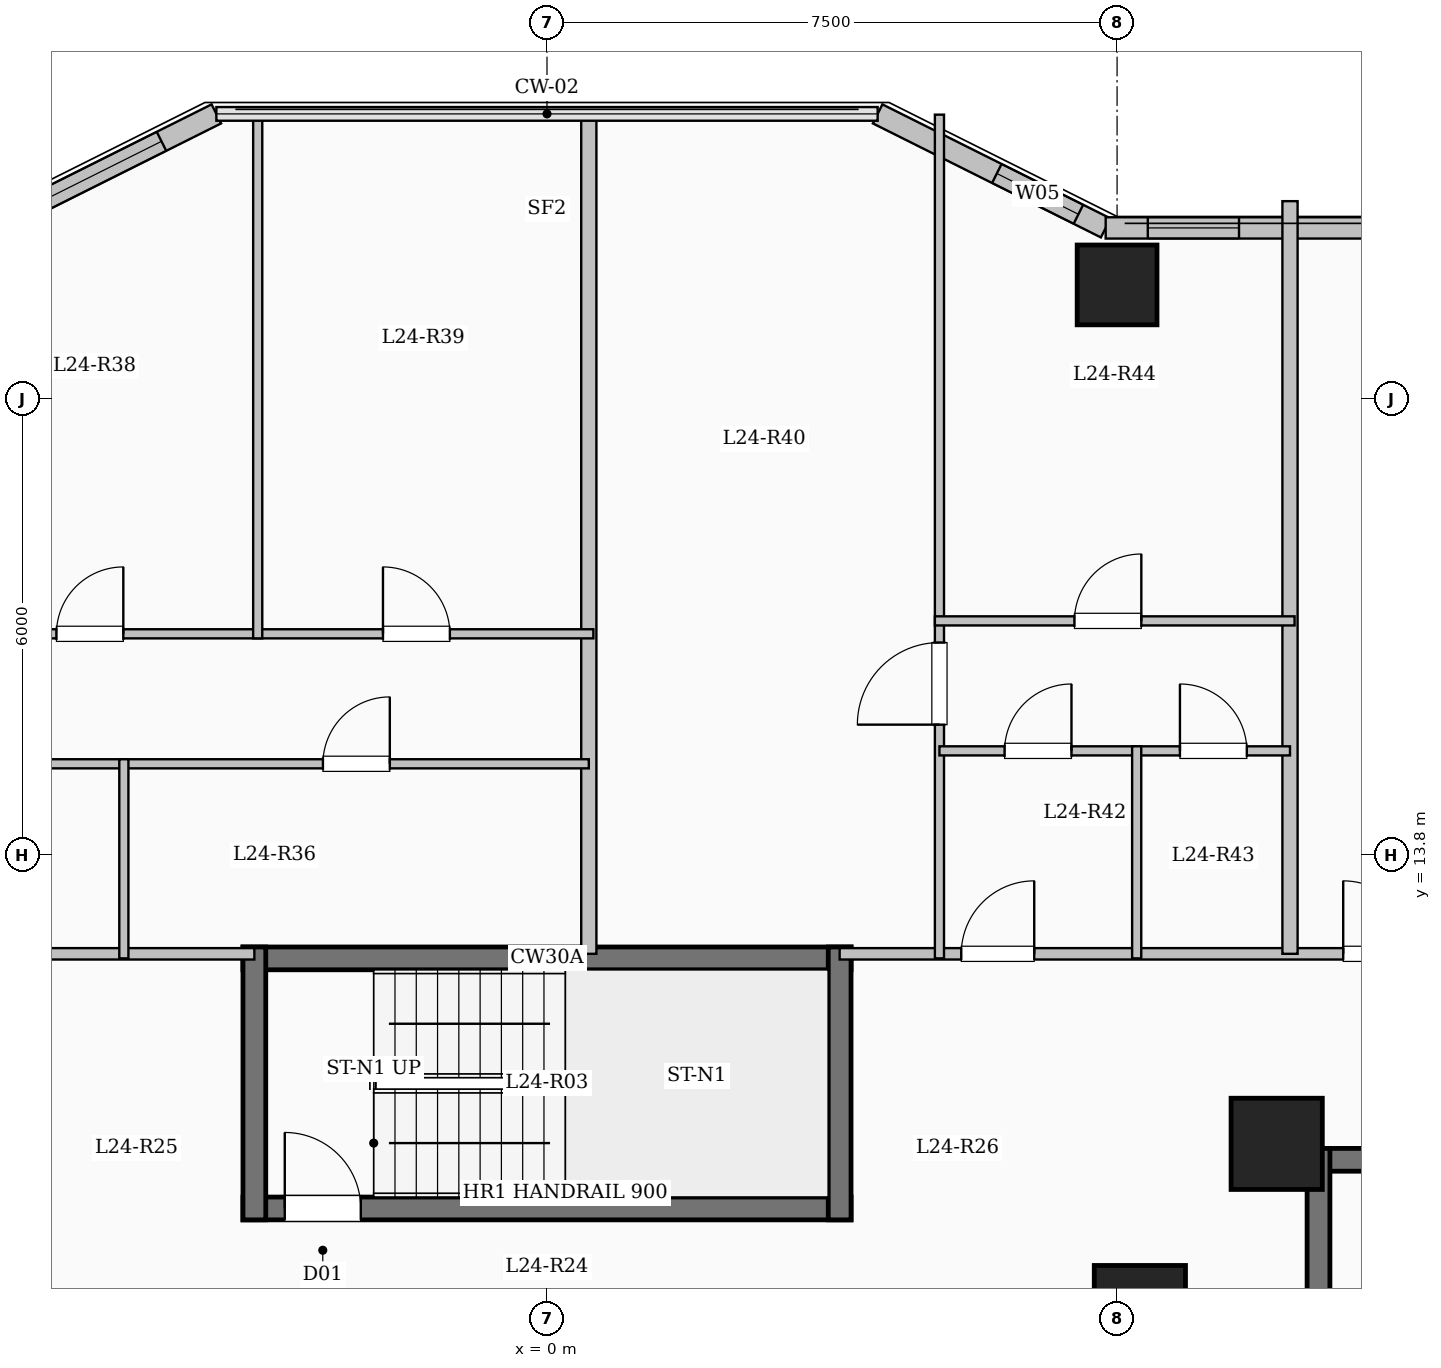
"""IFC4 building model, lengths in metres.
Left out: names, types, materials, properties, quantities, classifications, styles, units other than length and angle.
Written with IfcOpenShell. Run it as: python <this file> out.ifc"""

import sys

from ifc_helpers import new_model, si_unit, direction, frame, frame_2d, origin, origin_2d, place, context, subcontext, project, spatial, rectangle, extrude, element, fill, save


model = new_model("IFC4")
c1 = context("Model", 3, precision=1e-05, world=origin(), true_north=direction((0.0, 1.0)))
c2 = subcontext(c1, "Body", "Model", "MODEL_VIEW")
j1 = project(units=[si_unit("LENGTHUNIT", "METRE"), si_unit("PLANEANGLEUNIT", "RADIAN")], contexts=[c1])
p1 = place(None, origin())
s1 = spatial("IfcSite", under=j1, at=p1, CompositionType="ELEMENT")
p2 = place(p1, origin())
s2 = spatial("IfcBuilding", under=s1, at=p2, CompositionType="ELEMENT")
p3 = place(p2, frame((0.0, 0.0, 91.7)))
s3 = spatial("IfcBuildingStorey", under=s2, at=p3, CompositionType="ELEMENT", Elevation=91.7)
for number, where, z_axis, x_axis in (
    (1, (7.8, 7.8, 0.0), (0.0, 0.0, 1.0), (1.0, 0.0, 0.0)),
    (2, (9.6, 10.0, 0.0), (0.0, 0.0, 1.0), (1.0, 0.0, 0.0)),
):
    element("IfcColumn", number, at=place(p3, frame(where, z_axis=z_axis, x_axis=x_axis)), inside=s3, PredefinedType="COLUMN", context=c2, shape_type="SweptSolid", body=[
        extrude(rectangle(XDim=1.2, YDim=1.2, at=origin_2d()), origin(), (0.0, 0.0, 1.0), 3.35),
    ])
p4 = place(p3, frame((7.5, 21.3, 0.0), z_axis=(0.0, 0.0, 1.0), x_axis=(1.0, 0.0, 0.0)))
e3 = element("IfcColumn", 3, at=p4, inside=s3, PredefinedType="COLUMN", context=c2, shape_type="SweptSolid", body=[
    extrude(rectangle(XDim=1.05, YDim=1.05, at=origin_2d()), origin(), (0.0, 0.0, 1.0), 3.35),
])
p5 = place(p3, frame((-7.35, 22.05, 0.0), z_axis=(0.0, 0.0, 1.0), x_axis=(0.894427191, 0.4472135955, 0.0)))
e4 = element("IfcWall", 4, at=p5, inside=s3, PredefinedType="SOLIDWALL", context=c2, shape_type="SweptSolid", body=[
    extrude(rectangle(XDim=3.354, YDim=0.28, at=frame_2d((1.677, 0.0))), origin(), (0.0, 0.0, 1.0), 3.1),
])
p6 = place(p5, frame((0.747, 0.0, 0.9)))
e5 = element("IfcOpeningElement", 5, at=p6, cuts=e4, PredefinedType="OPENING", context=c2, shape_type="SweptSolid", body=[
    extrude(rectangle(XDim=1.8, YDim=1.65, at=frame_2d((0.9, 0.825))), frame((0.0, 0.15, 0.0), z_axis=(0.0, -1.0, 0.0), x_axis=(1.0, 0.0, 0.0)), (0.0, 0.0, 1.0), 0.3),
])
p7 = place(p3, frame((4.35, 23.55, 0.0), z_axis=(0.0, 0.0, 1.0), x_axis=(0.894427191, -0.4472135955, 0.0)))
e6 = element("IfcWall", 6, at=p7, inside=s3, PredefinedType="SOLIDWALL", context=c2, shape_type="SweptSolid", body=[
    extrude(rectangle(XDim=3.354, YDim=0.28, at=frame_2d((1.677, 0.0))), origin(), (0.0, 0.0, 1.0), 3.1),
])
p8 = place(p7, frame((1.753, 0.0, 0.95)))
e7 = element("IfcOpeningElement", 7, at=p8, cuts=e6, PredefinedType="OPENING", context=c2, shape_type="SweptSolid", body=[
    extrude(rectangle(XDim=1.2, YDim=1.5, at=frame_2d((0.6, 0.75))), frame((0.0, 0.15, 0.0), z_axis=(0.0, -1.0, 0.0), x_axis=(1.0, 0.0, 0.0)), (0.0, 0.0, 1.0), 0.3),
])
p9 = place(p3, frame((7.35, 22.05, 0.0), z_axis=(0.0, 0.0, 1.0), x_axis=(1.0, 0.0, 0.0)))
e8 = element("IfcWall", 8, at=p9, inside=s3, PredefinedType="SOLIDWALL", context=c2, shape_type="SweptSolid", body=[
    extrude(rectangle(XDim=13.8, YDim=0.28, at=frame_2d((6.9, 0.0))), origin(), (0.0, 0.0, 1.0), 3.1),
])
p10 = place(p9, frame((0.554, 0.0, 0.95)))
e9 = element("IfcOpeningElement", 9, at=p10, cuts=e8, PredefinedType="OPENING", context=c2, shape_type="SweptSolid", body=[
    extrude(rectangle(XDim=1.2, YDim=1.5, at=frame_2d((0.6, 0.75))), frame((0.0, 0.15, 0.0), z_axis=(0.0, -1.0, 0.0), x_axis=(1.0, 0.0, 0.0)), (0.0, 0.0, 1.0), 0.3),
])
p11 = place(p9, frame((4.044, 0.0, 0.9)))
e10 = element("IfcOpeningElement", 10, at=p11, cuts=e8, PredefinedType="OPENING", context=c2, shape_type="SweptSolid", body=[
    extrude(rectangle(XDim=2.4, YDim=1.8, at=frame_2d((1.2, 0.9))), frame((0.0, 0.15, 0.0), z_axis=(0.0, -1.0, 0.0), x_axis=(1.0, 0.0, 0.0)), (0.0, 0.0, 1.0), 0.3),
])
p12 = place(p9, frame((9.99, 0.0, 0.9)))
e11 = element("IfcOpeningElement", 11, at=p12, cuts=e8, PredefinedType="OPENING", context=c2, shape_type="SweptSolid", body=[
    extrude(rectangle(XDim=1.8, YDim=1.65, at=frame_2d((0.9, 0.825))), frame((0.0, 0.15, 0.0), z_axis=(0.0, -1.0, 0.0), x_axis=(1.0, 0.0, 0.0)), (0.0, 0.0, 1.0), 0.3),
])
p13 = place(p3, frame((10.0, 9.79, 0.0), z_axis=(0.0, 0.0, 1.0), x_axis=(1.0, 0.0, 0.0)))
e12 = element("IfcWall", 12, at=p13, inside=s3, PredefinedType="SHEAR", context=c2, shape_type="SweptSolid", body=[
    extrude(rectangle(XDim=8.0, YDim=0.3, at=frame_2d((4.0, 0.0))), origin(), (0.0, 0.0, 1.0), 3.35),
])
p14 = place(p3, frame((10.15, 6.35, 0.0), z_axis=(0.0, 0.0, 1.0), x_axis=(0.0, 1.0, 0.0)))
e13 = element("IfcWall", 13, at=p14, inside=s3, PredefinedType="SHEAR", context=c2, shape_type="SweptSolid", body=[
    extrude(rectangle(XDim=3.59, YDim=0.3, at=frame_2d((1.795, 0.0))), origin(), (0.0, 0.0, 1.0), 3.35),
])
p15 = place(p3, frame((-4.0, 12.44, 0.0), z_axis=(0.0, 0.0, 1.0), x_axis=(1.0, 0.0, 0.0)))
e14 = element("IfcWall", 14, at=p15, inside=s3, PredefinedType="SHEAR", context=c2, shape_type="SweptSolid", body=[
    extrude(rectangle(XDim=8.0, YDim=0.3, at=frame_2d((4.0, 0.0))), origin(), (0.0, 0.0, 1.0), 3.35),
])
p16 = place(p3, frame((-4.0, 9.15, 0.0), z_axis=(0.0, 0.0, 1.0), x_axis=(1.0, 0.0, 0.0)))
e15 = element("IfcWall", 15, at=p16, inside=s3, PredefinedType="SHEAR", context=c2, shape_type="SweptSolid", body=[
    extrude(rectangle(XDim=8.0, YDim=0.3, at=frame_2d((4.0, 0.0))), origin(), (0.0, 0.0, 1.0), 3.35),
])
p17 = place(p16, frame((0.55, 0.0, 0.0)))
e16 = element("IfcOpeningElement", 16, at=p17, cuts=e15, PredefinedType="OPENING", context=c2, shape_type="SweptSolid", body=[
    extrude(rectangle(XDim=1.0, YDim=2.15, at=frame_2d((0.5, 1.075))), frame((0.0, 0.16, 0.0), z_axis=(0.0, -1.0, 0.0), x_axis=(1.0, 0.0, 0.0)), (0.0, 0.0, 1.0), 0.32),
])
for number, where, z_axis, x_axis in (
    (17, (-3.85, 9.0, 0.0), (0.0, 0.0, 1.0), (0.0, 1.0, 0.0)),
    (18, (3.85, 9.0, 0.0), (0.0, 0.0, 1.0), (0.0, 1.0, 0.0)),
):
    element("IfcWall", number, at=place(p3, frame(where, z_axis=z_axis, x_axis=x_axis)), inside=s3, PredefinedType="SHEAR", context=c2, shape_type="SweptSolid", body=[
        extrude(rectangle(XDim=3.59, YDim=0.3, at=frame_2d((1.795, 0.0))), origin(), (0.0, 0.0, 1.0), 3.35),
    ])
p18 = place(p3, frame((-21.05, 12.5, 0.0), z_axis=(0.0, 0.0, 1.0), x_axis=(1.0, 0.0, 0.0)))
e19 = element("IfcWall", 19, at=p18, inside=s3, PredefinedType="PARTITIONING", context=c2, shape_type="SweptSolid", body=[
    extrude(rectangle(XDim=17.2, YDim=0.15, at=frame_2d((8.6, 0.0))), origin(), (0.0, 0.0, 1.0), 3.1),
])
p19 = place(p18, frame((0.7, 0.0, 0.0)))
e20 = element("IfcOpeningElement", 20, at=p19, cuts=e19, PredefinedType="OPENING", context=c2, shape_type="SweptSolid", body=[
    extrude(rectangle(XDim=0.96, YDim=2.15, at=frame_2d((0.48, 1.075))), frame((0.0, 0.085, 0.0), z_axis=(0.0, -1.0, 0.0), x_axis=(1.0, 0.0, 0.0)), (0.0, 0.0, 1.0), 0.17),
])
p20 = place(p3, frame((3.85, 12.5, 0.0), z_axis=(0.0, 0.0, 1.0), x_axis=(1.0, 0.0, 0.0)))
e21 = element("IfcWall", 21, at=p20, inside=s3, PredefinedType="PARTITIONING", context=c2, shape_type="SweptSolid", body=[
    extrude(rectangle(XDim=17.2, YDim=0.15, at=frame_2d((8.6, 0.0))), origin(), (0.0, 0.0, 1.0), 3.1),
])
p21 = place(p20, frame((1.6, 0.0, 0.0)))
e22 = element("IfcOpeningElement", 22, at=p21, cuts=e21, PredefinedType="OPENING", context=c2, shape_type="SweptSolid", body=[
    extrude(rectangle(XDim=0.96, YDim=2.15, at=frame_2d((0.48, 1.075))), frame((0.0, 0.085, 0.0), z_axis=(0.0, -1.0, 0.0), x_axis=(1.0, 0.0, 0.0)), (0.0, 0.0, 1.0), 0.17),
])
p22 = place(p20, frame((6.625, 0.0, 0.0)))
e23 = element("IfcOpeningElement", 23, at=p22, cuts=e21, PredefinedType="OPENING", context=c2, shape_type="SweptSolid", body=[
    extrude(rectangle(XDim=0.96, YDim=2.15, at=frame_2d((0.48, 1.075))), frame((0.0, 0.085, 0.0), z_axis=(0.0, -1.0, 0.0), x_axis=(1.0, 0.0, 0.0)), (0.0, 0.0, 1.0), 0.17),
])
p23 = place(p3, frame((0.55, 12.5, 0.0), z_axis=(0.0, 0.0, 1.0), x_axis=(0.0, 1.0, 0.0)))
e24 = element("IfcWall", 24, at=p23, inside=s3, PredefinedType="SOLIDWALL", context=c2, shape_type="SweptSolid", body=[
    extrude(rectangle(XDim=11.08, YDim=0.2, at=frame_2d((5.54, 0.0))), origin(), (0.0, 0.0, 1.0), 3.1),
])
p24 = place(p3, frame((-12.398, 15.0, 0.0), z_axis=(0.0, 0.0, 1.0), x_axis=(1.0, 0.0, 0.0)))
e25 = element("IfcWall", 25, at=p24, inside=s3, PredefinedType="PARTITIONING", context=c2, shape_type="SweptSolid", body=[
    extrude(rectangle(XDim=6.831, YDim=0.12, at=frame_2d((3.416, 0.0))), origin(), (0.0, 0.0, 1.0), 3.1),
])
p25 = place(p24, frame((2.975, 0.0, 0.0)))
e26 = element("IfcOpeningElement", 26, at=p25, cuts=e25, PredefinedType="OPENING", context=c2, shape_type="SweptSolid", body=[
    extrude(rectangle(XDim=0.88, YDim=2.1, at=frame_2d((0.44, 1.05))), frame((0.0, 0.07, 0.0), z_axis=(0.0, -1.0, 0.0), x_axis=(1.0, 0.0, 0.0)), (0.0, 0.0, 1.0), 0.14),
])
p26 = place(p3, frame((-5.567, 15.0, 0.0), z_axis=(0.0, 0.0, 1.0), x_axis=(1.0, 0.0, 0.0)))
e27 = element("IfcWall", 27, at=p26, inside=s3, PredefinedType="PARTITIONING", context=c2, shape_type="SweptSolid", body=[
    extrude(rectangle(XDim=6.117, YDim=0.12, at=frame_2d((3.059, 0.0))), origin(), (0.0, 0.0, 1.0), 3.1),
])
p27 = place(p26, frame((2.619, 0.0, 0.0)))
e28 = element("IfcOpeningElement", 28, at=p27, cuts=e27, PredefinedType="OPENING", context=c2, shape_type="SweptSolid", body=[
    extrude(rectangle(XDim=0.88, YDim=2.1, at=frame_2d((0.44, 1.05))), frame((0.0, 0.07, 0.0), z_axis=(0.0, -1.0, 0.0), x_axis=(1.0, 0.0, 0.0)), (0.0, 0.0, 1.0), 0.14),
])
p28 = place(p3, frame((-12.458, 16.71, 0.0), z_axis=(0.0, 0.0, 1.0), x_axis=(1.0, 0.0, 0.0)))
e29 = element("IfcWall", 29, at=p28, inside=s3, PredefinedType="PARTITIONING", context=c2, shape_type="SweptSolid", body=[
    extrude(rectangle(XDim=13.068, YDim=0.12, at=frame_2d((6.534, 0.0))), origin(), (0.0, 0.0, 1.0), 3.1),
])
p29 = place(p28, frame((1.708, 0.0, 0.0)))
e30 = element("IfcOpeningElement", 30, at=p29, cuts=e29, PredefinedType="OPENING", context=c2, shape_type="SweptSolid", body=[
    extrude(rectangle(XDim=0.88, YDim=2.1, at=frame_2d((0.44, 1.05))), frame((0.0, 0.07, 0.0), z_axis=(0.0, -1.0, 0.0), x_axis=(1.0, 0.0, 0.0)), (0.0, 0.0, 1.0), 0.14),
])
p30 = place(p28, frame((6.004, 0.0, 0.0)))
e31 = element("IfcOpeningElement", 31, at=p30, cuts=e29, PredefinedType="OPENING", context=c2, shape_type="SweptSolid", body=[
    extrude(rectangle(XDim=0.88, YDim=2.1, at=frame_2d((0.44, 1.05))), frame((0.0, 0.07, 0.0), z_axis=(0.0, -1.0, 0.0), x_axis=(1.0, 0.0, 0.0)), (0.0, 0.0, 1.0), 0.14),
])
p31 = place(p28, frame((10.3, 0.0, 0.0)))
e32 = element("IfcOpeningElement", 32, at=p31, cuts=e29, PredefinedType="OPENING", context=c2, shape_type="SweptSolid", body=[
    extrude(rectangle(XDim=0.88, YDim=2.1, at=frame_2d((0.44, 1.05))), frame((0.0, 0.07, 0.0), z_axis=(0.0, -1.0, 0.0), x_axis=(1.0, 0.0, 0.0)), (0.0, 0.0, 1.0), 0.14),
])
p32 = place(p3, frame((-5.567, 12.44, 0.0), z_axis=(0.0, 0.0, 1.0), x_axis=(0.0, 1.0, 0.0)))
e33 = element("IfcWall", 33, at=p32, inside=s3, PredefinedType="PARTITIONING", context=c2, shape_type="SweptSolid", body=[
    extrude(rectangle(XDim=2.62, YDim=0.12, at=frame_2d((1.31, 0.0))), origin(), (0.0, 0.0, 1.0), 3.1),
])
p33 = place(p3, frame((-3.806, 16.65, 0.0), z_axis=(0.0, 0.0, 1.0), x_axis=(0.0, 1.0, 0.0)))
e34 = element("IfcWall", 34, at=p33, inside=s3, PredefinedType="PARTITIONING", context=c2, shape_type="SweptSolid", body=[
    extrude(rectangle(XDim=6.93, YDim=0.12, at=frame_2d((3.465, 0.0))), origin(), (0.0, 0.0, 1.0), 3.1),
])
p34 = place(p3, frame((9.775, 12.5, 0.0), z_axis=(0.0, 0.0, 1.0), x_axis=(0.0, 1.0, 0.0)))
e35 = element("IfcWall", 35, at=p34, inside=s3, PredefinedType="SOLIDWALL", context=c2, shape_type="SweptSolid", body=[
    extrude(rectangle(XDim=9.902, YDim=0.2, at=frame_2d((4.951, 0.0))), origin(), (0.0, 0.0, 1.0), 3.1),
])
p35 = place(p3, frame((5.163, 12.44, 0.0), z_axis=(0.0, 0.0, 1.0), x_axis=(0.0, 1.0, 0.0)))
e36 = element("IfcWall", 36, at=p35, inside=s3, PredefinedType="PARTITIONING", context=c2, shape_type="SweptSolid", body=[
    extrude(rectangle(XDim=11.1, YDim=0.12, at=frame_2d((5.55, 0.0))), origin(), (0.0, 0.0, 1.0), 3.1),
])
p36 = place(p35, frame((3.075, 0.0, 0.0)))
e37 = element("IfcOpeningElement", 37, at=p36, cuts=e36, PredefinedType="OPENING", context=c2, shape_type="SweptSolid", body=[
    extrude(rectangle(XDim=1.08, YDim=2.15, at=frame_2d((0.54, 1.075))), frame((0.0, 0.07, 0.0), z_axis=(0.0, -1.0, 0.0), x_axis=(1.0, 0.0, 0.0)), (0.0, 0.0, 1.0), 0.14),
])
p37 = place(p3, frame((5.163, 15.17, 0.0), z_axis=(0.0, 0.0, 1.0), x_axis=(1.0, 0.0, 0.0)))
e38 = element("IfcWall", 38, at=p37, inside=s3, PredefinedType="PARTITIONING", context=c2, shape_type="SweptSolid", body=[
    extrude(rectangle(XDim=2.595, YDim=0.12, at=frame_2d((1.297, 0.0))), origin(), (0.0, 0.0, 1.0), 3.1),
])
p38 = place(p37, frame((0.857, 0.0, 0.0)))
e39 = element("IfcOpeningElement", 39, at=p38, cuts=e38, PredefinedType="OPENING", context=c2, shape_type="SweptSolid", body=[
    extrude(rectangle(XDim=0.88, YDim=2.1, at=frame_2d((0.44, 1.05))), frame((0.0, 0.07, 0.0), z_axis=(0.0, -1.0, 0.0), x_axis=(1.0, 0.0, 0.0)), (0.0, 0.0, 1.0), 0.14),
])
p39 = place(p3, frame((7.758, 15.17, 0.0), z_axis=(0.0, 0.0, 1.0), x_axis=(1.0, 0.0, 0.0)))
e40 = element("IfcWall", 40, at=p39, inside=s3, PredefinedType="PARTITIONING", context=c2, shape_type="SweptSolid", body=[
    extrude(rectangle(XDim=2.017, YDim=0.12, at=frame_2d((1.008, 0.0))), origin(), (0.0, 0.0, 1.0), 3.1),
])
p40 = place(p39, frame((0.569, 0.0, 0.0)))
e41 = element("IfcOpeningElement", 41, at=p40, cuts=e40, PredefinedType="OPENING", context=c2, shape_type="SweptSolid", body=[
    extrude(rectangle(XDim=0.88, YDim=2.1, at=frame_2d((0.44, 1.05))), frame((0.0, 0.07, 0.0), z_axis=(0.0, -1.0, 0.0), x_axis=(1.0, 0.0, 0.0)), (0.0, 0.0, 1.0), 0.14),
])
p41 = place(p3, frame((5.103, 16.88, 0.0), z_axis=(0.0, 0.0, 1.0), x_axis=(1.0, 0.0, 0.0)))
e42 = element("IfcWall", 42, at=p41, inside=s3, PredefinedType="PARTITIONING", context=c2, shape_type="SweptSolid", body=[
    extrude(rectangle(XDim=4.732, YDim=0.12, at=frame_2d((2.366, 0.0))), origin(), (0.0, 0.0, 1.0), 3.1),
])
p42 = place(p41, frame((1.836, 0.0, 0.0)))
e43 = element("IfcOpeningElement", 43, at=p42, cuts=e42, PredefinedType="OPENING", context=c2, shape_type="SweptSolid", body=[
    extrude(rectangle(XDim=0.88, YDim=2.1, at=frame_2d((0.44, 1.05))), frame((0.0, 0.07, 0.0), z_axis=(0.0, -1.0, 0.0), x_axis=(1.0, 0.0, 0.0)), (0.0, 0.0, 1.0), 0.14),
])
p43 = place(p3, frame((7.758, 12.44, 0.0), z_axis=(0.0, 0.0, 1.0), x_axis=(0.0, 1.0, 0.0)))
e44 = element("IfcWall", 44, at=p43, inside=s3, PredefinedType="PARTITIONING", context=c2, shape_type="SweptSolid", body=[
    extrude(rectangle(XDim=2.79, YDim=0.12, at=frame_2d((1.395, 0.0))), origin(), (0.0, 0.0, 1.0), 2.435),
])
p44 = place(p6, origin())
e45 = element("IfcWindow", 45, at=p44, inside=s3, PartitioningType="SINGLE_PANEL", PredefinedType="WINDOW", context=c2, shape_type="SweptSolid", body=[
    extrude(rectangle(XDim=1.8, YDim=1.65, at=frame_2d((0.9, 0.825))), frame((0.0, 0.03, 0.0), z_axis=(0.0, -1.0, 0.0), x_axis=(1.0, 0.0, 0.0)), (0.0, 0.0, 1.0), 0.06),
])
fill(e5, e45)
p45 = place(p8, origin())
e46 = element("IfcWindow", 46, at=p45, inside=s3, PartitioningType="SINGLE_PANEL", PredefinedType="WINDOW", context=c2, shape_type="SweptSolid", body=[
    extrude(rectangle(XDim=1.2, YDim=1.5, at=frame_2d((0.6, 0.75))), frame((0.0, 0.03, 0.0), z_axis=(0.0, -1.0, 0.0), x_axis=(1.0, 0.0, 0.0)), (0.0, 0.0, 1.0), 0.06),
])
fill(e7, e46)
p46 = place(p10, origin())
e47 = element("IfcWindow", 47, at=p46, inside=s3, PartitioningType="SINGLE_PANEL", PredefinedType="WINDOW", context=c2, shape_type="SweptSolid", body=[
    extrude(rectangle(XDim=1.2, YDim=1.5, at=frame_2d((0.6, 0.75))), frame((0.0, 0.03, 0.0), z_axis=(0.0, -1.0, 0.0), x_axis=(1.0, 0.0, 0.0)), (0.0, 0.0, 1.0), 0.06),
])
fill(e9, e47)
p47 = place(p17, origin())
e48 = element("IfcDoor", 48, at=p47, inside=s3, OperationType="SINGLE_SWING_LEFT", PredefinedType="DOOR", context=c2, shape_type="SweptSolid", body=[
    extrude(rectangle(XDim=1.0, YDim=2.15, at=frame_2d((0.5, 1.075))), frame((0.0, 0.025, 0.0), z_axis=(0.0, -1.0, 0.0), x_axis=(1.0, 0.0, 0.0)), (0.0, 0.0, 1.0), 0.05),
])
fill(e16, e48)
p48 = place(p27, origin())
e49 = element("IfcDoor", 49, at=p48, inside=s3, OperationType="SINGLE_SWING_RIGHT", PredefinedType="DOOR", context=c2, shape_type="SweptSolid", body=[
    extrude(rectangle(XDim=0.88, YDim=2.1, at=frame_2d((0.44, 1.05))), frame((0.0, 0.025, 0.0), z_axis=(0.0, -1.0, 0.0), x_axis=(1.0, 0.0, 0.0)), (0.0, 0.0, 1.0), 0.05),
])
fill(e28, e49)
p49 = place(p30, origin())
e50 = element("IfcDoor", 50, at=p49, inside=s3, OperationType="SINGLE_SWING_RIGHT", PredefinedType="DOOR", context=c2, shape_type="SweptSolid", body=[
    extrude(rectangle(XDim=0.88, YDim=2.1, at=frame_2d((0.44, 1.05))), frame((0.0, 0.025, 0.0), z_axis=(0.0, -1.0, 0.0), x_axis=(1.0, 0.0, 0.0)), (0.0, 0.0, 1.0), 0.05),
])
fill(e31, e50)
p50 = place(p31, origin())
e51 = element("IfcDoor", 51, at=p50, inside=s3, OperationType="SINGLE_SWING_LEFT", PredefinedType="DOOR", context=c2, shape_type="SweptSolid", body=[
    extrude(rectangle(XDim=0.88, YDim=2.1, at=frame_2d((0.44, 1.05))), frame((0.0, 0.025, 0.0), z_axis=(0.0, -1.0, 0.0), x_axis=(1.0, 0.0, 0.0)), (0.0, 0.0, 1.0), 0.05),
])
fill(e32, e51)
p51 = place(p21, origin())
e52 = element("IfcDoor", 52, at=p51, inside=s3, OperationType="SINGLE_SWING_RIGHT", PredefinedType="DOOR", context=c2, shape_type="SweptSolid", body=[
    extrude(rectangle(XDim=0.96, YDim=2.15, at=frame_2d((0.48, 1.075))), frame((0.0, 0.025, 0.0), z_axis=(0.0, -1.0, 0.0), x_axis=(1.0, 0.0, 0.0)), (0.0, 0.0, 1.0), 0.05),
])
fill(e22, e52)
p52 = place(p36, origin())
e53 = element("IfcDoor", 53, at=p52, inside=s3, OperationType="SINGLE_SWING_LEFT", PredefinedType="DOOR", context=c2, shape_type="SweptSolid", body=[
    extrude(rectangle(XDim=1.08, YDim=2.15, at=frame_2d((0.54, 1.075))), frame((0.0, 0.025, 0.0), z_axis=(0.0, -1.0, 0.0), x_axis=(1.0, 0.0, 0.0)), (0.0, 0.0, 1.0), 0.05),
])
fill(e37, e53)
p53 = place(p38, origin())
e54 = element("IfcDoor", 54, at=p53, inside=s3, OperationType="SINGLE_SWING_RIGHT", PredefinedType="DOOR", context=c2, shape_type="SweptSolid", body=[
    extrude(rectangle(XDim=0.88, YDim=2.1, at=frame_2d((0.44, 1.05))), frame((0.0, 0.025, 0.0), z_axis=(0.0, -1.0, 0.0), x_axis=(1.0, 0.0, 0.0)), (0.0, 0.0, 1.0), 0.05),
])
fill(e39, e54)
p54 = place(p40, origin())
e55 = element("IfcDoor", 55, at=p54, inside=s3, OperationType="SINGLE_SWING_LEFT", PredefinedType="DOOR", context=c2, shape_type="SweptSolid", body=[
    extrude(rectangle(XDim=0.88, YDim=2.1, at=frame_2d((0.44, 1.05))), frame((0.0, 0.025, 0.0), z_axis=(0.0, -1.0, 0.0), x_axis=(1.0, 0.0, 0.0)), (0.0, 0.0, 1.0), 0.05),
])
fill(e41, e55)
p55 = place(p42, origin())
e56 = element("IfcDoor", 56, at=p55, inside=s3, OperationType="SINGLE_SWING_RIGHT", PredefinedType="DOOR", context=c2, shape_type="SweptSolid", body=[
    extrude(rectangle(XDim=0.88, YDim=2.1, at=frame_2d((0.44, 1.05))), frame((0.0, 0.025, 0.0), z_axis=(0.0, -1.0, 0.0), x_axis=(1.0, 0.0, 0.0)), (0.0, 0.0, 1.0), 0.05),
])
fill(e43, e56)
p56 = place(p22, origin())
e57 = element("IfcDoor", 57, at=p56, inside=s3, OperationType="SINGLE_SWING_LEFT", PredefinedType="DOOR", context=c2, shape_type="SweptSolid", body=[
    extrude(rectangle(XDim=0.96, YDim=2.15, at=frame_2d((0.48, 1.075))), frame((0.0, 0.025, 0.0), z_axis=(0.0, -1.0, 0.0), x_axis=(1.0, 0.0, 0.0)), (0.0, 0.0, 1.0), 0.05),
])
fill(e23, e57)
save(model, sys.argv[1])
